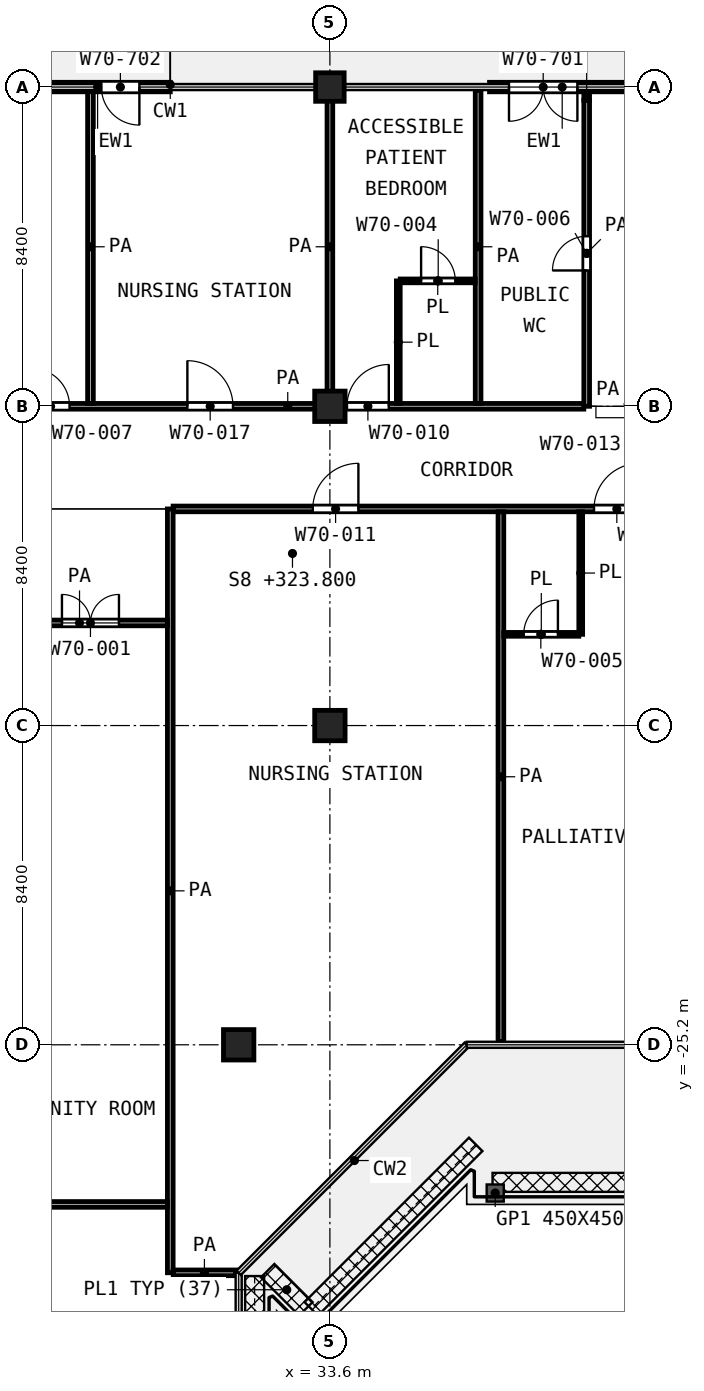
"""IFC4 building model, lengths in metres.
Left out: names, types, materials, properties, quantities, classifications, styles, units other than length and angle.
Written with IfcOpenShell. Run it as: python <this file> out.ifc"""

import sys

from ifc_helpers import new_model, si_unit, direction, frame, frame_2d, origin, origin_2d, place, context, subcontext, project, spatial, rectangle, extrude, element, fill, save


model = new_model("IFC4")
c1 = context("Model", 3, precision=1e-05, world=origin(), true_north=direction((0.0, 1.0)))
c2 = subcontext(c1, "Body", "Model", "MODEL_VIEW")
j1 = project(units=[si_unit("LENGTHUNIT", "METRE"), si_unit("PLANEANGLEUNIT", "RADIAN")], contexts=[c1])
p1 = place(None, origin())
s1 = spatial("IfcSite", under=j1, at=p1, CompositionType="ELEMENT")
p2 = place(p1, origin())
s2 = spatial("IfcBuilding", under=s1, at=p2, CompositionType="ELEMENT")
p3 = place(p2, frame((0.0, 0.0, 323.8)))
s3 = spatial("IfcBuildingStorey", under=s2, at=p3, CompositionType="ELEMENT", Elevation=323.8)
p4 = place(p3, frame((33.6, 0.0, 0.0), z_axis=(0.0, 0.0, 1.0), x_axis=(1.0, 0.0, 0.0)))
e1 = element("IfcColumn", 1, at=p4, inside=s3, PredefinedType="COLUMN", context=c2, shape_type="SweptSolid", body=[
    extrude(rectangle(XDim=0.75, YDim=0.75, at=origin_2d()), origin(), (0.0, 0.0, 1.0), 4.2),
])
for number, where, z_axis, x_axis in (
    (2, (33.6, -8.4, 0.0), (0.0, 0.0, 1.0), (1.0, 0.0, 0.0)),
    (3, (33.6, -16.8, 0.0), (0.0, 0.0, 1.0), (1.0, 0.0, 0.0)),
    (4, (31.2, -25.2, 0.0), (0.0, 0.0, 1.0), (1.0, 0.0, 0.0)),
):
    element("IfcColumn", number, at=place(p3, frame(where, z_axis=z_axis, x_axis=x_axis)), inside=s3, PredefinedType="COLUMN", context=c2, shape_type="SweptSolid", body=[
        extrude(rectangle(XDim=0.8, YDim=0.8, at=origin_2d()), origin(), (0.0, 0.0, 1.0), 4.2),
    ])
p5 = place(p3, frame((41.625, 0.0, 0.0), z_axis=(0.0, 0.0, 1.0), x_axis=(-1.0, 0.0, 0.0)))
e5 = element("IfcWall", 5, at=p5, inside=s3, PredefinedType="SOLIDWALL", context=c2, shape_type="SweptSolid", body=[
    extrude(rectangle(XDim=3.825, YDim=0.25, at=frame_2d((1.913, 0.0))), origin(), (0.0, 0.0, 1.0), 3.48),
])
p6 = place(p5, frame((1.512, 0.0, 0.0)))
e6 = element("IfcOpeningElement", 6, at=p6, cuts=e5, PredefinedType="OPENING", context=c2, shape_type="SweptSolid", body=[
    extrude(rectangle(XDim=1.8, YDim=2.1, at=frame_2d((0.9, 1.05))), frame((0.0, 0.135, 0.0), z_axis=(0.0, -1.0, 0.0), x_axis=(1.0, 0.0, 0.0)), (0.0, 0.0, 1.0), 0.27),
])
p7 = place(p3, frame((29.4, 0.0, 0.0), z_axis=(0.0, 0.0, 1.0), x_axis=(-1.0, 0.0, 0.0)))
e7 = element("IfcWall", 7, at=p7, inside=s3, PredefinedType="SOLIDWALL", context=c2, shape_type="SweptSolid", body=[
    extrude(rectangle(XDim=3.825, YDim=0.25, at=frame_2d((1.913, 0.0))), origin(), (0.0, 0.0, 1.0), 3.48),
])
p8 = place(p7, frame((0.812, 0.0, 0.0)))
e8 = element("IfcOpeningElement", 8, at=p8, cuts=e7, PredefinedType="OPENING", context=c2, shape_type="SweptSolid", body=[
    extrude(rectangle(XDim=1.0, YDim=2.1, at=frame_2d((0.5, 1.05))), frame((0.0, 0.135, 0.0), z_axis=(0.0, -1.0, 0.0), x_axis=(1.0, 0.0, 0.0)), (0.0, 0.0, 1.0), 0.27),
])
p9 = place(p3, frame((38.175, -14.4, 0.0), z_axis=(0.0, 0.0, 1.0), x_axis=(1.0, 0.0, 0.0)))
e9 = element("IfcWall", 9, at=p9, inside=s3, PredefinedType="PARTITIONING", context=c2, shape_type="SweptSolid", body=[
    extrude(rectangle(XDim=1.975, YDim=0.1, at=frame_2d((0.987, 0.0))), origin(), (0.0, 0.0, 1.0), 3.6),
])
p10 = place(p9, frame((0.525, 0.0, 0.0)))
e10 = element("IfcOpeningElement", 10, at=p10, cuts=e9, PredefinedType="OPENING", context=c2, shape_type="SweptSolid", body=[
    extrude(rectangle(XDim=0.9, YDim=2.1, at=frame_2d((0.45, 1.05))), frame((0.0, 0.06, 0.0), z_axis=(0.0, -1.0, 0.0), x_axis=(1.0, 0.0, 0.0)), (0.0, 0.0, 1.0), 0.12),
])
p11 = place(p3, frame((35.45, -5.1, 0.0), z_axis=(0.0, 0.0, 1.0), x_axis=(1.0, 0.0, 0.0)))
e11 = element("IfcWall", 11, at=p11, inside=s3, PredefinedType="PARTITIONING", context=c2, shape_type="SweptSolid", body=[
    extrude(rectangle(XDim=1.975, YDim=0.1, at=frame_2d((0.988, 0.0))), origin(), (0.0, 0.0, 1.0), 3.6),
])
p12 = place(p11, frame((0.55, 0.0, 0.0)))
e12 = element("IfcOpeningElement", 12, at=p12, cuts=e11, PredefinedType="OPENING", context=c2, shape_type="SweptSolid", body=[
    extrude(rectangle(XDim=0.9, YDim=2.1, at=frame_2d((0.45, 1.05))), frame((0.0, 0.06, 0.0), z_axis=(0.0, -1.0, 0.0), x_axis=(1.0, 0.0, 0.0)), (0.0, 0.0, 1.0), 0.12),
])
for number, where, z_axis, x_axis in (
    (13, (35.4, -8.325, 0.0), (0.0, 0.0, 1.0), (0.0, 1.0, 0.0)),
    (14, (40.2, -14.4, 0.0), (0.0, 0.0, 1.0), (0.0, 1.0, 0.0)),
):
    element("IfcWall", number, at=place(p3, frame(where, z_axis=z_axis, x_axis=x_axis)), inside=s3, PredefinedType="PARTITIONING", context=c2, shape_type="SweptSolid", body=[
        extrude(rectangle(XDim=3.225, YDim=0.1, at=frame_2d((1.612, 0.0))), origin(), (0.0, 0.0, 1.0), 3.6),
    ])
p13 = place(p3, frame((29.477, -31.2, 0.0), z_axis=(0.0, 0.0, 1.0), x_axis=(1.0, 0.0, 0.0)))
e15 = element("IfcWall", 15, at=p13, inside=s3, PredefinedType="PARTITIONING", context=c2, shape_type="SweptSolid", body=[
    extrude(rectangle(XDim=1.643, YDim=0.15, at=frame_2d((0.822, 0.0))), origin(), (0.0, 0.0, 1.0), 3.6),
])
p14 = place(p3, frame((11.175, -29.4, 0.0), z_axis=(0.0, 0.0, 1.0), x_axis=(1.0, 0.0, 0.0)))
e16 = element("IfcWall", 16, at=p14, inside=s3, PredefinedType="PARTITIONING", context=c2, shape_type="SweptSolid", body=[
    extrude(rectangle(XDim=18.15, YDim=0.15, at=frame_2d((9.075, 0.0))), origin(), (0.0, 0.0, 1.0), 3.6),
])
p15 = place(p3, frame((24.7, -14.1, 0.0), z_axis=(0.0, 0.0, 1.0), x_axis=(1.0, 0.0, 0.0)))
e17 = element("IfcWall", 17, at=p15, inside=s3, PredefinedType="PARTITIONING", context=c2, shape_type="SweptSolid", body=[
    extrude(rectangle(XDim=4.625, YDim=0.15, at=frame_2d((2.312, 0.0))), origin(), (0.0, 0.0, 1.0), 3.6),
])
p16 = place(p15, frame((1.85, 0.0, 0.0)))
e18 = element("IfcOpeningElement", 18, at=p16, cuts=e17, PredefinedType="OPENING", context=c2, shape_type="SweptSolid", body=[
    extrude(rectangle(XDim=1.5, YDim=2.1, at=frame_2d((0.75, 1.05))), frame((0.0, 0.085, 0.0), z_axis=(0.0, -1.0, 0.0), x_axis=(1.0, 0.0, 0.0)), (0.0, 0.0, 1.0), 0.17),
])
p17 = place(p3, frame((29.475, -11.1, 0.0), z_axis=(0.0, 0.0, 1.0), x_axis=(1.0, 0.0, 0.0)))
e19 = element("IfcWall", 19, at=p17, inside=s3, PredefinedType="PARTITIONING", context=c2, shape_type="SweptSolid", body=[
    extrude(rectangle(XDim=29.245, YDim=0.15, at=frame_2d((14.623, 0.0))), origin(), (0.0, 0.0, 1.0), 3.6),
])
p18 = place(p17, frame((3.675, 0.0, 0.0)))
e20 = element("IfcOpeningElement", 20, at=p18, cuts=e19, PredefinedType="OPENING", context=c2, shape_type="SweptSolid", body=[
    extrude(rectangle(XDim=1.2, YDim=2.1, at=frame_2d((0.6, 1.05))), frame((0.0, 0.085, 0.0), z_axis=(0.0, -1.0, 0.0), x_axis=(1.0, 0.0, 0.0)), (0.0, 0.0, 1.0), 0.17),
])
p19 = place(p17, frame((14.175, 0.0, 0.0)))
e21 = element("IfcOpeningElement", 21, at=p19, cuts=e19, PredefinedType="OPENING", context=c2, shape_type="SweptSolid", body=[
    extrude(rectangle(XDim=1.2, YDim=2.1, at=frame_2d((0.6, 1.05))), frame((0.0, 0.085, 0.0), z_axis=(0.0, -1.0, 0.0), x_axis=(1.0, 0.0, 0.0)), (0.0, 0.0, 1.0), 0.17),
])
p20 = place(p17, frame((12.625, 0.0, 0.0)))
e22 = element("IfcOpeningElement", 22, at=p20, cuts=e19, PredefinedType="OPENING", context=c2, shape_type="SweptSolid", body=[
    extrude(rectangle(XDim=1.2, YDim=2.1, at=frame_2d((0.6, 1.05))), frame((0.0, 0.085, 0.0), z_axis=(0.0, -1.0, 0.0), x_axis=(1.0, 0.0, 0.0)), (0.0, 0.0, 1.0), 0.17),
])
p21 = place(p17, frame((11.075, 0.0, 0.0)))
e23 = element("IfcOpeningElement", 23, at=p21, cuts=e19, PredefinedType="OPENING", context=c2, shape_type="SweptSolid", body=[
    extrude(rectangle(XDim=1.2, YDim=2.1, at=frame_2d((0.6, 1.05))), frame((0.0, 0.085, 0.0), z_axis=(0.0, -1.0, 0.0), x_axis=(1.0, 0.0, 0.0)), (0.0, 0.0, 1.0), 0.17),
])
p22 = place(p17, frame((18.025, 0.0, 0.0)))
e24 = element("IfcOpeningElement", 24, at=p22, cuts=e19, PredefinedType="OPENING", context=c2, shape_type="SweptSolid", body=[
    extrude(rectangle(XDim=1.0, YDim=2.1, at=frame_2d((0.5, 1.05))), frame((0.0, 0.085, 0.0), z_axis=(0.0, -1.0, 0.0), x_axis=(1.0, 0.0, 0.0)), (0.0, 0.0, 1.0), 0.17),
])
p23 = place(p17, frame((24.375, 0.0, 0.0)))
e25 = element("IfcOpeningElement", 25, at=p23, cuts=e19, PredefinedType="OPENING", context=c2, shape_type="SweptSolid", body=[
    extrude(rectangle(XDim=1.5, YDim=2.1, at=frame_2d((0.75, 1.05))), frame((0.0, 0.085, 0.0), z_axis=(0.0, -1.0, 0.0), x_axis=(1.0, 0.0, 0.0)), (0.0, 0.0, 1.0), 0.17),
])
p24 = place(p3, frame((24.7, -8.4, 0.0), z_axis=(0.0, 0.0, 1.0), x_axis=(1.0, 0.0, 0.0)))
e26 = element("IfcWall", 26, at=p24, inside=s3, PredefinedType="PARTITIONING", context=c2, shape_type="SweptSolid", body=[
    extrude(rectangle(XDim=15.582, YDim=0.15, at=frame_2d((7.791, 0.0))), origin(), (0.0, 0.0, 1.0), 3.6),
])
p25 = place(p24, frame((9.35, 0.0, 0.0)))
e27 = element("IfcOpeningElement", 27, at=p25, cuts=e26, PredefinedType="OPENING", context=c2, shape_type="SweptSolid", body=[
    extrude(rectangle(XDim=1.1, YDim=2.1, at=frame_2d((0.55, 1.05))), frame((0.0, 0.085, 0.0), z_axis=(0.0, -1.0, 0.0), x_axis=(1.0, 0.0, 0.0)), (0.0, 0.0, 1.0), 0.17),
])
p26 = place(p24, frame((1.05, 0.0, 0.0)))
e28 = element("IfcOpeningElement", 28, at=p26, cuts=e26, PredefinedType="OPENING", context=c2, shape_type="SweptSolid", body=[
    extrude(rectangle(XDim=1.0, YDim=2.1, at=frame_2d((0.5, 1.05))), frame((0.0, 0.085, 0.0), z_axis=(0.0, -1.0, 0.0), x_axis=(1.0, 0.0, 0.0)), (0.0, 0.0, 1.0), 0.17),
])
p27 = place(p24, frame((5.15, 0.0, 0.0)))
e29 = element("IfcOpeningElement", 29, at=p27, cuts=e26, PredefinedType="OPENING", context=c2, shape_type="SweptSolid", body=[
    extrude(rectangle(XDim=1.2, YDim=2.1, at=frame_2d((0.6, 1.05))), frame((0.0, 0.085, 0.0), z_axis=(0.0, -1.0, 0.0), x_axis=(1.0, 0.0, 0.0)), (0.0, 0.0, 1.0), 0.17),
])
p28 = place(p3, frame((27.3, -8.325, 0.0), z_axis=(0.0, 0.0, 1.0), x_axis=(0.0, 1.0, 0.0)))
e30 = element("IfcWall", 30, at=p28, inside=s3, PredefinedType="PARTITIONING", context=c2, shape_type="SweptSolid", body=[
    extrude(rectangle(XDim=8.245, YDim=0.15, at=frame_2d((4.123, 0.0))), origin(), (0.0, 0.0, 1.0), 3.6),
])
p29 = place(p3, frame((29.4, -31.198, 0.0), z_axis=(0.0, 0.0, 1.0), x_axis=(0.0, 1.0, 0.0)))
e31 = element("IfcWall", 31, at=p29, inside=s3, PredefinedType="PARTITIONING", context=c2, shape_type="SweptSolid", body=[
    extrude(rectangle(XDim=20.098, YDim=0.15, at=frame_2d((10.049, 0.0))), origin(), (0.0, 0.0, 1.0), 3.6),
])
for number, where, z_axis, x_axis in (
    (32, (33.6, -8.325, 0.0), (0.0, 0.0, 1.0), (0.0, 1.0, 0.0)),
    (33, (37.5, -8.325, 0.0), (0.0, 0.0, 1.0), (0.0, 1.0, 0.0)),
):
    element("IfcWall", number, at=place(p3, frame(where, z_axis=z_axis, x_axis=x_axis)), inside=s3, PredefinedType="PARTITIONING", context=c2, shape_type="SweptSolid", body=[
        extrude(rectangle(XDim=8.245, YDim=0.15, at=frame_2d((4.123, 0.0))), origin(), (0.0, 0.0, 1.0), 3.6),
    ])
p30 = place(p3, frame((38.1, -25.12, 0.0), z_axis=(0.0, 0.0, 1.0), x_axis=(0.0, 1.0, 0.0)))
e34 = element("IfcWall", 34, at=p30, inside=s3, PredefinedType="PARTITIONING", context=c2, shape_type="SweptSolid", body=[
    extrude(rectangle(XDim=13.945, YDim=0.15, at=frame_2d((6.973, 0.0))), origin(), (0.0, 0.0, 1.0), 3.6),
])
p31 = place(p3, frame((40.357, -8.4, 0.0), z_axis=(0.0, 0.0, 1.0), x_axis=(0.0, 1.0, 0.0)))
e35 = element("IfcWall", 35, at=p31, inside=s3, PredefinedType="PARTITIONING", context=c2, shape_type="SweptSolid", body=[
    extrude(rectangle(XDim=8.048, YDim=0.15, at=frame_2d((4.024, 0.0))), origin(), (0.0, 0.0, 1.0), 3.6),
])
p32 = place(p31, frame((3.574, 0.0, 0.0)))
e36 = element("IfcOpeningElement", 36, at=p32, cuts=e35, PredefinedType="OPENING", context=c2, shape_type="SweptSolid", body=[
    extrude(rectangle(XDim=0.9, YDim=2.1, at=frame_2d((0.45, 1.05))), frame((0.0, 0.085, 0.0), z_axis=(0.0, -1.0, 0.0), x_axis=(1.0, 0.0, 0.0)), (0.0, 0.0, 1.0), 0.17),
])
p33 = place(p3, frame((40.357, -0.35, 0.0), z_axis=(0.0, 0.0, 1.0), x_axis=(0.0, 1.0, 0.0)))
e37 = element("IfcWall", 37, at=p33, inside=s3, PredefinedType="PARTITIONING", context=c2, shape_type="SweptSolid", body=[
    extrude(rectangle(XDim=0.27, YDim=0.15, at=frame_2d((0.135, 0.0))), origin(), (0.0, 0.0, 1.0), 3.6),
])
p34 = place(p6, origin())
e38 = element("IfcDoor", 38, at=p34, inside=s3, OperationType="DOUBLE_DOOR_SINGLE_SWING", PredefinedType="DOOR", context=c2, shape_type="SweptSolid", body=[
    extrude(rectangle(XDim=1.8, YDim=2.1, at=frame_2d((0.9, 1.05))), frame((0.0, 0.025, 0.0), z_axis=(0.0, -1.0, 0.0), x_axis=(1.0, 0.0, 0.0)), (0.0, 0.0, 1.0), 0.05),
])
fill(e6, e38)
p35 = place(p8, origin())
e39 = element("IfcDoor", 39, at=p35, inside=s3, OperationType="SINGLE_SWING_LEFT", PredefinedType="DOOR", context=c2, shape_type="SweptSolid", body=[
    extrude(rectangle(XDim=1.0, YDim=2.1, at=frame_2d((0.5, 1.05))), frame((0.0, 0.025, 0.0), z_axis=(0.0, -1.0, 0.0), x_axis=(1.0, 0.0, 0.0)), (0.0, 0.0, 1.0), 0.05),
])
fill(e8, e39)
p36 = place(p16, origin())
e40 = element("IfcDoor", 40, at=p36, inside=s3, OperationType="DOUBLE_DOOR_SINGLE_SWING", PredefinedType="DOOR", context=c2, shape_type="SweptSolid", body=[
    extrude(rectangle(XDim=1.5, YDim=2.1, at=frame_2d((0.75, 1.05))), frame((0.0, 0.025, 0.0), z_axis=(0.0, -1.0, 0.0), x_axis=(1.0, 0.0, 0.0)), (0.0, 0.0, 1.0), 0.05),
])
fill(e18, e40)
p37 = place(p25, origin())
e41 = element("IfcDoor", 41, at=p37, inside=s3, OperationType="SINGLE_SWING_RIGHT", PredefinedType="DOOR", context=c2, shape_type="SweptSolid", body=[
    extrude(rectangle(XDim=1.1, YDim=2.1, at=frame_2d((0.55, 1.05))), frame((0.0, 0.025, 0.0), z_axis=(0.0, -1.0, 0.0), x_axis=(1.0, 0.0, 0.0)), (0.0, 0.0, 1.0), 0.05),
])
fill(e27, e41)
p38 = place(p12, origin())
e42 = element("IfcDoor", 42, at=p38, inside=s3, OperationType="SINGLE_SWING_LEFT", PredefinedType="DOOR", context=c2, shape_type="SweptSolid", body=[
    extrude(rectangle(XDim=0.9, YDim=2.1, at=frame_2d((0.45, 1.05))), frame((0.0, 0.025, 0.0), z_axis=(0.0, -1.0, 0.0), x_axis=(1.0, 0.0, 0.0)), (0.0, 0.0, 1.0), 0.05),
])
fill(e12, e42)
p39 = place(p18, origin())
e43 = element("IfcDoor", 43, at=p39, inside=s3, OperationType="SINGLE_SWING_RIGHT", PredefinedType="DOOR", context=c2, shape_type="SweptSolid", body=[
    extrude(rectangle(XDim=1.2, YDim=2.1, at=frame_2d((0.6, 1.05))), frame((0.0, 0.025, 0.0), z_axis=(0.0, -1.0, 0.0), x_axis=(1.0, 0.0, 0.0)), (0.0, 0.0, 1.0), 0.05),
])
fill(e20, e43)
p40 = place(p21, origin())
e44 = element("IfcDoor", 44, at=p40, inside=s3, OperationType="SINGLE_SWING_RIGHT", PredefinedType="DOOR", context=c2, shape_type="SweptSolid", body=[
    extrude(rectangle(XDim=1.2, YDim=2.1, at=frame_2d((0.6, 1.05))), frame((0.0, 0.025, 0.0), z_axis=(0.0, -1.0, 0.0), x_axis=(1.0, 0.0, 0.0)), (0.0, 0.0, 1.0), 0.05),
])
fill(e23, e44)
p41 = place(p10, origin())
e45 = element("IfcDoor", 45, at=p41, inside=s3, OperationType="SINGLE_SWING_RIGHT", PredefinedType="DOOR", context=c2, shape_type="SweptSolid", body=[
    extrude(rectangle(XDim=0.9, YDim=2.1, at=frame_2d((0.45, 1.05))), frame((0.0, 0.025, 0.0), z_axis=(0.0, -1.0, 0.0), x_axis=(1.0, 0.0, 0.0)), (0.0, 0.0, 1.0), 0.05),
])
fill(e10, e45)
p42 = place(p32, origin())
e46 = element("IfcDoor", 46, at=p42, inside=s3, OperationType="SINGLE_SWING_LEFT", PredefinedType="DOOR", context=c2, shape_type="SweptSolid", body=[
    extrude(rectangle(XDim=0.9, YDim=2.1, at=frame_2d((0.45, 1.05))), frame((0.0, 0.025, 0.0), z_axis=(0.0, -1.0, 0.0), x_axis=(1.0, 0.0, 0.0)), (0.0, 0.0, 1.0), 0.05),
])
fill(e36, e46)
p43 = place(p26, origin())
e47 = element("IfcDoor", 47, at=p43, inside=s3, OperationType="SINGLE_SWING_LEFT", PredefinedType="DOOR", context=c2, shape_type="SweptSolid", body=[
    extrude(rectangle(XDim=1.0, YDim=2.1, at=frame_2d((0.5, 1.05))), frame((0.0, 0.025, 0.0), z_axis=(0.0, -1.0, 0.0), x_axis=(1.0, 0.0, 0.0)), (0.0, 0.0, 1.0), 0.05),
])
fill(e28, e47)
p44 = place(p27, origin())
e48 = element("IfcDoor", 48, at=p44, inside=s3, OperationType="SINGLE_SWING_LEFT", PredefinedType="DOOR", context=c2, shape_type="SweptSolid", body=[
    extrude(rectangle(XDim=1.2, YDim=2.1, at=frame_2d((0.6, 1.05))), frame((0.0, 0.025, 0.0), z_axis=(0.0, -1.0, 0.0), x_axis=(1.0, 0.0, 0.0)), (0.0, 0.0, 1.0), 0.05),
])
fill(e29, e48)
save(model, sys.argv[1])
